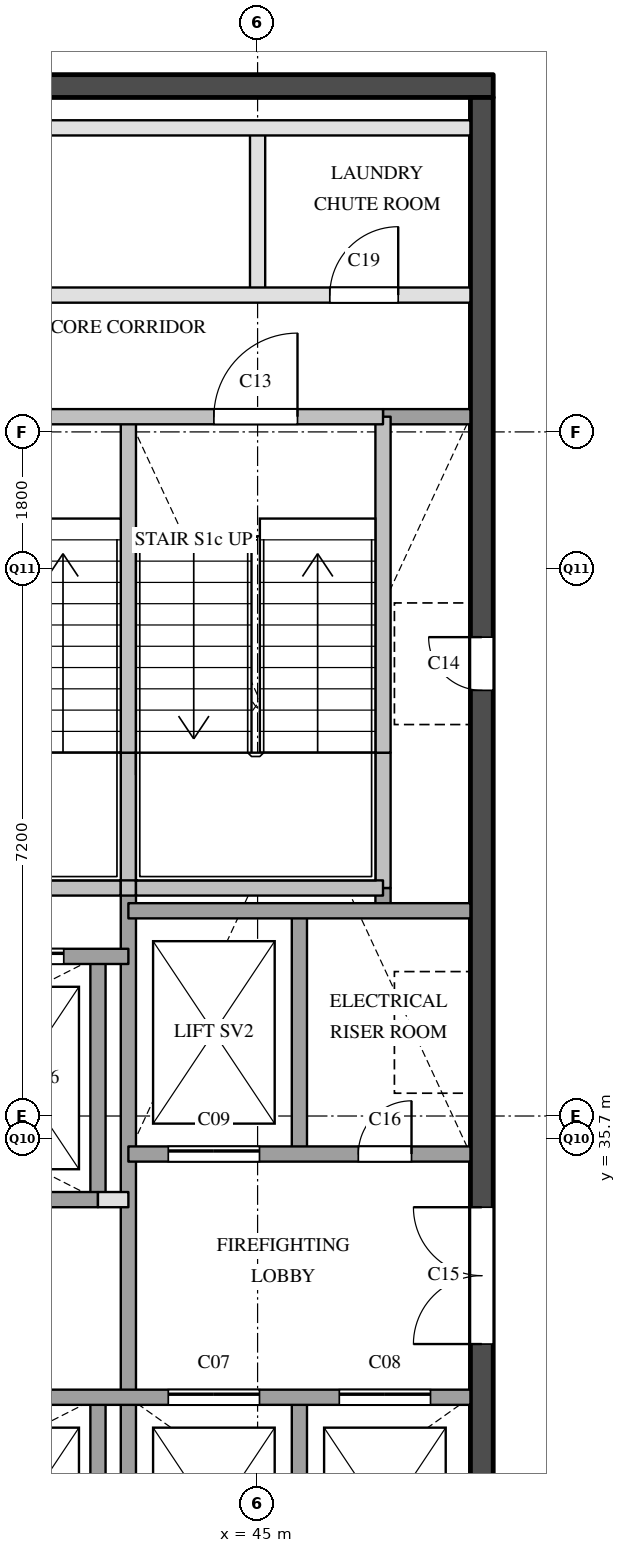
"""IFC4 building model, lengths in metres.
Left out: names, types, materials, properties, quantities, classifications, styles, units other than length and angle.
Written with IfcOpenShell. Run it as: python <this file> out.ifc"""

import sys

from ifc_helpers import new_model, si_unit, direction, frame, frame_2d, origin, place, context, subcontext, project, spatial, rectangle, extrude, element, fill, save


model = new_model("IFC4")
c1 = context("Model", 3, precision=1e-05, world=origin(), true_north=direction((0.0, 1.0)))
c2 = subcontext(c1, "Body", "Model", "MODEL_VIEW")
j1 = project(units=[si_unit("LENGTHUNIT", "METRE"), si_unit("PLANEANGLEUNIT", "RADIAN")], contexts=[c1])
p1 = place(None, origin())
s1 = spatial("IfcSite", under=j1, at=p1, CompositionType="ELEMENT")
p2 = place(p1, origin())
s2 = spatial("IfcBuilding", under=s1, at=p2, CompositionType="ELEMENT")
p3 = place(p2, frame((0.0, 0.0, 312.9)))
s3 = spatial("IfcBuildingStorey", under=s2, at=p3, CompositionType="ELEMENT", Elevation=312.9)
p4 = place(p3, frame((36.3, 49.55, 0.0), z_axis=(0.0, 0.0, 1.0), x_axis=(1.0, 0.0, 0.0)))
e1 = element("IfcWall", 1, at=p4, inside=s3, PredefinedType="SHEAR", context=c2, shape_type="SweptSolid", body=[
    extrude(rectangle(XDim=11.8, YDim=0.3, at=frame_2d((5.9, 0.0))), origin(), (0.0, 0.0, 1.0), 3.6),
])
p5 = place(p3, frame((47.95, 29.1, 0.0), z_axis=(0.0, 0.0, 1.0), x_axis=(0.0, 1.0, 0.0)))
e2 = element("IfcWall", 2, at=p5, inside=s3, PredefinedType="SHEAR", context=c2, shape_type="SweptSolid", body=[
    extrude(rectangle(XDim=20.3, YDim=0.3, at=frame_2d((10.15, 0.0))), origin(), (0.0, 0.0, 1.0), 3.6),
])
p6 = place(p5, frame((12.5, 0.0, 0.0)))
e3 = element("IfcOpeningElement", 3, at=p6, cuts=e2, PredefinedType="OPENING", context=c2, shape_type="SweptSolid", body=[
    extrude(rectangle(XDim=0.7, YDim=2.1, at=frame_2d((0.35, 1.05))), frame((0.0, 0.16, 0.0), z_axis=(0.0, -1.0, 0.0), x_axis=(1.0, 0.0, 0.0)), (0.0, 0.0, 1.0), 0.32),
])
p7 = place(p5, frame((3.9, 0.0, 0.0)))
e4 = element("IfcOpeningElement", 4, at=p7, cuts=e2, PredefinedType="OPENING", context=c2, shape_type="SweptSolid", body=[
    extrude(rectangle(XDim=1.8, YDim=2.1, at=frame_2d((0.9, 1.05))), frame((0.0, 0.16, 0.0), z_axis=(0.0, -1.0, 0.0), x_axis=(1.0, 0.0, 0.0)), (0.0, 0.0, 1.0), 0.32),
])
p8 = place(p3, frame((42.9, 29.1, 0.0), z_axis=(0.0, 0.0, 1.0), x_axis=(0.0, 1.0, 0.0)))
e5 = element("IfcWall", 5, at=p8, inside=s3, PredefinedType="SOLIDWALL", context=c2, shape_type="SweptSolid", body=[
    extrude(rectangle(XDim=3.2, YDim=0.2, at=frame_2d((1.6, 0.0))), origin(), (0.0, 0.0, 1.0), 3.6),
])
p9 = place(p3, frame((42.9, 34.9, 0.0), z_axis=(0.0, 0.0, 1.0), x_axis=(0.0, 1.0, 0.0)))
e6 = element("IfcWall", 6, at=p9, inside=s3, PredefinedType="SOLIDWALL", context=c2, shape_type="SweptSolid", body=[
    extrude(rectangle(XDim=3.2, YDim=0.2, at=frame_2d((1.6, 0.0))), origin(), (0.0, 0.0, 1.0), 3.6),
])
p10 = place(p3, frame((43.3, 29.1, 0.0), z_axis=(0.0, 0.0, 1.0), x_axis=(0.0, 1.0, 0.0)))
e7 = element("IfcWall", 7, at=p10, inside=s3, PredefinedType="SOLIDWALL", context=c2, shape_type="SweptSolid", body=[
    extrude(rectangle(XDim=9.9, YDim=0.2, at=frame_2d((4.95, 0.0))), origin(), (0.0, 0.0, 1.0), 3.6),
])
p11 = place(p3, frame((43.3, 39.0, 0.0), z_axis=(0.0, 0.0, 1.0), x_axis=(0.0, 1.0, 0.0)))
e8 = element("IfcWall", 8, at=p11, inside=s3, PredefinedType="SOLIDWALL", context=c2, shape_type="SweptSolid", body=[
    extrude(rectangle(XDim=1.78, YDim=0.2, at=frame_2d((0.89, 0.0))), origin(), (0.0, 0.0, 1.0), 3.6),
])
p12 = place(p3, frame((43.3, 40.78, 0.0), z_axis=(0.0, 0.0, 1.0), x_axis=(0.0, 1.0, 0.0)))
e9 = element("IfcWall", 9, at=p12, inside=s3, PredefinedType="SOLIDWALL", context=c2, shape_type="SweptSolid", body=[
    extrude(rectangle(XDim=4.42, YDim=0.2, at=frame_2d((2.21, 0.0))), origin(), (0.0, 0.0, 1.0), 3.6),
])
p13 = place(p3, frame((45.0, 46.8, 0.0), z_axis=(0.0, 0.0, 1.0), x_axis=(0.0, 1.0, 0.0)))
e10 = element("IfcWall", 10, at=p13, inside=s3, PredefinedType="PARTITIONING", context=c2, shape_type="SweptSolid", body=[
    extrude(rectangle(XDim=2.2, YDim=0.2, at=frame_2d((1.1, 0.0))), origin(), (0.0, 0.0, 1.0), 3.6),
])
for number, where, z_axis, x_axis in (
    (11, (45.55, 29.1, 0.0), (0.0, 0.0, 1.0), (0.0, 1.0, 0.0)),
    (12, (45.55, 35.5, 0.0), (0.0, 0.0, 1.0), (0.0, 1.0, 0.0)),
):
    element("IfcWall", number, at=place(p3, frame(where, z_axis=z_axis, x_axis=x_axis)), inside=s3, PredefinedType="SOLIDWALL", context=c2, shape_type="SweptSolid", body=[
        extrude(rectangle(XDim=3.2, YDim=0.2, at=frame_2d((1.6, 0.0))), origin(), (0.0, 0.0, 1.0), 3.6),
    ])
p14 = place(p3, frame((46.65, 38.7, 0.0), z_axis=(0.0, 0.0, 1.0), x_axis=(0.0, 1.0, 0.0)))
e13 = element("IfcWall", 13, at=p14, inside=s3, PredefinedType="SOLIDWALL", context=c2, shape_type="SweptSolid", body=[
    extrude(rectangle(XDim=0.3, YDim=0.2, at=frame_2d((0.15, 0.0))), origin(), (0.0, 0.0, 1.0), 3.6),
])
p15 = place(p3, frame((46.65, 39.0, 0.0), z_axis=(0.0, 0.0, 1.0), x_axis=(0.0, 1.0, 0.0)))
e14 = element("IfcWall", 14, at=p15, inside=s3, PredefinedType="SOLIDWALL", context=c2, shape_type="SweptSolid", body=[
    extrude(rectangle(XDim=1.78, YDim=0.2, at=frame_2d((0.89, 0.0))), origin(), (0.0, 0.0, 1.0), 3.6),
])
p16 = place(p3, frame((46.65, 40.78, 0.0), z_axis=(0.0, 0.0, 1.0), x_axis=(0.0, 1.0, 0.0)))
e15 = element("IfcWall", 15, at=p16, inside=s3, PredefinedType="SOLIDWALL", context=c2, shape_type="SweptSolid", body=[
    extrude(rectangle(XDim=4.42, YDim=0.2, at=frame_2d((2.21, 0.0))), origin(), (0.0, 0.0, 1.0), 3.6),
])
p17 = place(p3, frame((36.6, 32.3, 0.0), z_axis=(0.0, 0.0, 1.0), x_axis=(1.0, 0.0, 0.0)))
e16 = element("IfcWall", 16, at=p17, inside=s3, PredefinedType="SOLIDWALL", context=c2, shape_type="SweptSolid", body=[
    extrude(rectangle(XDim=11.2, YDim=0.2, at=frame_2d((5.6, 0.0))), origin(), (0.0, 0.0, 1.0), 3.6),
])
p18 = place(p17, frame((7.225, 0.0, 0.0)))
e17 = element("IfcOpeningElement", 17, at=p18, cuts=e16, PredefinedType="OPENING", context=c2, shape_type="SweptSolid", body=[
    extrude(rectangle(XDim=1.2, YDim=2.1, at=frame_2d((0.6, 1.05))), frame((0.0, 0.11, 0.0), z_axis=(0.0, -1.0, 0.0), x_axis=(1.0, 0.0, 0.0)), (0.0, 0.0, 1.0), 0.22),
])
p19 = place(p17, frame((9.475, 0.0, 0.0)))
e18 = element("IfcOpeningElement", 18, at=p19, cuts=e16, PredefinedType="OPENING", context=c2, shape_type="SweptSolid", body=[
    extrude(rectangle(XDim=1.2, YDim=2.1, at=frame_2d((0.6, 1.05))), frame((0.0, 0.11, 0.0), z_axis=(0.0, -1.0, 0.0), x_axis=(1.0, 0.0, 0.0)), (0.0, 0.0, 1.0), 0.22),
])
p20 = place(p3, frame((42.9, 34.9, 0.0), z_axis=(0.0, 0.0, 1.0), x_axis=(1.0, 0.0, 0.0)))
e19 = element("IfcWall", 19, at=p20, inside=s3, PredefinedType="PARTITIONING", context=c2, shape_type="SweptSolid", body=[
    extrude(rectangle(XDim=0.4, YDim=0.2, at=frame_2d((0.2, 0.0))), origin(), (0.0, 0.0, 1.0), 3.6),
])
p21 = place(p3, frame((36.6, 34.9, 0.0), z_axis=(0.0, 0.0, 1.0), x_axis=(1.0, 0.0, 0.0)))
e20 = element("IfcWall", 20, at=p21, inside=s3, PredefinedType="SOLIDWALL", context=c2, shape_type="SweptSolid", body=[
    extrude(rectangle(XDim=6.3, YDim=0.2, at=frame_2d((3.15, 0.0))), origin(), (0.0, 0.0, 1.0), 3.6),
])
p22 = place(p3, frame((43.3, 35.5, 0.0), z_axis=(0.0, 0.0, 1.0), x_axis=(1.0, 0.0, 0.0)))
e21 = element("IfcWall", 21, at=p22, inside=s3, PredefinedType="SOLIDWALL", context=c2, shape_type="SweptSolid", body=[
    extrude(rectangle(XDim=4.5, YDim=0.2, at=frame_2d((2.25, 0.0))), origin(), (0.0, 0.0, 1.0), 3.6),
])
p23 = place(p22, frame((0.525, 0.0, 0.0)))
e22 = element("IfcOpeningElement", 22, at=p23, cuts=e21, PredefinedType="OPENING", context=c2, shape_type="SweptSolid", body=[
    extrude(rectangle(XDim=1.2, YDim=2.1, at=frame_2d((0.6, 1.05))), frame((0.0, 0.11, 0.0), z_axis=(0.0, -1.0, 0.0), x_axis=(1.0, 0.0, 0.0)), (0.0, 0.0, 1.0), 0.22),
])
p24 = place(p22, frame((3.025, 0.0, 0.0)))
e23 = element("IfcOpeningElement", 23, at=p24, cuts=e21, PredefinedType="OPENING", context=c2, shape_type="SweptSolid", body=[
    extrude(rectangle(XDim=0.7, YDim=2.1, at=frame_2d((0.35, 1.05))), frame((0.0, 0.11, 0.0), z_axis=(0.0, -1.0, 0.0), x_axis=(1.0, 0.0, 0.0)), (0.0, 0.0, 1.0), 0.22),
])
p25 = place(p3, frame((36.6, 38.1, 0.0), z_axis=(0.0, 0.0, 1.0), x_axis=(1.0, 0.0, 0.0)))
e24 = element("IfcWall", 24, at=p25, inside=s3, PredefinedType="SOLIDWALL", context=c2, shape_type="SweptSolid", body=[
    extrude(rectangle(XDim=6.7, YDim=0.2, at=frame_2d((3.35, 0.0))), origin(), (0.0, 0.0, 1.0), 3.6),
])
p26 = place(p25, frame((0.45, 0.0, 0.0)))
e25 = element("IfcOpeningElement", 25, at=p26, cuts=e24, PredefinedType="OPENING", context=c2, shape_type="SweptSolid", body=[
    extrude(rectangle(XDim=1.2, YDim=2.1, at=frame_2d((0.6, 1.05))), frame((0.0, 0.11, 0.0), z_axis=(0.0, -1.0, 0.0), x_axis=(1.0, 0.0, 0.0)), (0.0, 0.0, 1.0), 0.22),
])
p27 = place(p25, frame((2.55, 0.0, 0.0)))
e26 = element("IfcOpeningElement", 26, at=p27, cuts=e24, PredefinedType="OPENING", context=c2, shape_type="SweptSolid", body=[
    extrude(rectangle(XDim=1.2, YDim=2.1, at=frame_2d((0.6, 1.05))), frame((0.0, 0.11, 0.0), z_axis=(0.0, -1.0, 0.0), x_axis=(1.0, 0.0, 0.0)), (0.0, 0.0, 1.0), 0.22),
])
p28 = place(p25, frame((4.65, 0.0, 0.0)))
e27 = element("IfcOpeningElement", 27, at=p28, cuts=e24, PredefinedType="OPENING", context=c2, shape_type="SweptSolid", body=[
    extrude(rectangle(XDim=1.2, YDim=2.1, at=frame_2d((0.6, 1.05))), frame((0.0, 0.11, 0.0), z_axis=(0.0, -1.0, 0.0), x_axis=(1.0, 0.0, 0.0)), (0.0, 0.0, 1.0), 0.22),
])
p29 = place(p3, frame((43.3, 38.7, 0.0), z_axis=(0.0, 0.0, 1.0), x_axis=(1.0, 0.0, 0.0)))
e28 = element("IfcWall", 28, at=p29, inside=s3, PredefinedType="SOLIDWALL", context=c2, shape_type="SweptSolid", body=[
    extrude(rectangle(XDim=4.5, YDim=0.2, at=frame_2d((2.25, 0.0))), origin(), (0.0, 0.0, 1.0), 3.6),
])
p30 = place(p3, frame((40.05, 39.0, 0.0), z_axis=(0.0, 0.0, 1.0), x_axis=(1.0, 0.0, 0.0)))
e29 = element("IfcWall", 29, at=p30, inside=s3, PredefinedType="SOLIDWALL", context=c2, shape_type="SweptSolid", body=[
    extrude(rectangle(XDim=3.15, YDim=0.2, at=frame_2d((1.575, 0.0))), origin(), (0.0, 0.0, 1.0), 3.6),
])
p31 = place(p3, frame((43.2, 39.0, 0.0), z_axis=(0.0, 0.0, 1.0), x_axis=(1.0, 0.0, 0.0)))
e30 = element("IfcWall", 30, at=p31, inside=s3, PredefinedType="SOLIDWALL", context=c2, shape_type="SweptSolid", body=[
    extrude(rectangle(XDim=0.2, YDim=0.2, at=frame_2d((0.1, 0.0))), origin(), (0.0, 0.0, 1.0), 3.6),
])
p32 = place(p3, frame((43.4, 39.0, 0.0), z_axis=(0.0, 0.0, 1.0), x_axis=(1.0, 0.0, 0.0)))
e31 = element("IfcWall", 31, at=p32, inside=s3, PredefinedType="SOLIDWALL", context=c2, shape_type="SweptSolid", body=[
    extrude(rectangle(XDim=3.25, YDim=0.2, at=frame_2d((1.625, 0.0))), origin(), (0.0, 0.0, 1.0), 3.6),
])
p33 = place(p3, frame((46.65, 45.2, 0.0), z_axis=(0.0, 0.0, 1.0), x_axis=(1.0, 0.0, 0.0)))
e32 = element("IfcWall", 32, at=p33, inside=s3, PredefinedType="SOLIDWALL", context=c2, shape_type="SweptSolid", body=[
    extrude(rectangle(XDim=1.15, YDim=0.2, at=frame_2d((0.575, 0.0))), origin(), (0.0, 0.0, 1.0), 3.6),
])
p34 = place(p3, frame((36.6, 45.2, 0.0), z_axis=(0.0, 0.0, 1.0), x_axis=(1.0, 0.0, 0.0)))
e33 = element("IfcWall", 33, at=p34, inside=s3, PredefinedType="SOLIDWALL", context=c2, shape_type="SweptSolid", body=[
    extrude(rectangle(XDim=10.05, YDim=0.2, at=frame_2d((5.025, 0.0))), origin(), (0.0, 0.0, 1.0), 3.6),
])
p35 = place(p34, frame((1.125, 0.0, 0.0)))
e34 = element("IfcOpeningElement", 34, at=p35, cuts=e33, PredefinedType="OPENING", context=c2, shape_type="SweptSolid", body=[
    extrude(rectangle(XDim=1.1, YDim=2.1, at=frame_2d((0.55, 1.05))), frame((0.0, 0.11, 0.0), z_axis=(0.0, -1.0, 0.0), x_axis=(1.0, 0.0, 0.0)), (0.0, 0.0, 1.0), 0.22),
])
p36 = place(p34, frame((4.475, 0.0, 0.0)))
e35 = element("IfcOpeningElement", 35, at=p36, cuts=e33, PredefinedType="OPENING", context=c2, shape_type="SweptSolid", body=[
    extrude(rectangle(XDim=1.1, YDim=2.1, at=frame_2d((0.55, 1.05))), frame((0.0, 0.11, 0.0), z_axis=(0.0, -1.0, 0.0), x_axis=(1.0, 0.0, 0.0)), (0.0, 0.0, 1.0), 0.22),
])
p37 = place(p34, frame((7.825, 0.0, 0.0)))
e36 = element("IfcOpeningElement", 36, at=p37, cuts=e33, PredefinedType="OPENING", context=c2, shape_type="SweptSolid", body=[
    extrude(rectangle(XDim=1.1, YDim=2.1, at=frame_2d((0.55, 1.05))), frame((0.0, 0.11, 0.0), z_axis=(0.0, -1.0, 0.0), x_axis=(1.0, 0.0, 0.0)), (0.0, 0.0, 1.0), 0.22),
])
p38 = place(p3, frame((36.6, 46.8, 0.0), z_axis=(0.0, 0.0, 1.0), x_axis=(1.0, 0.0, 0.0)))
e37 = element("IfcWall", 37, at=p38, inside=s3, PredefinedType="PARTITIONING", context=c2, shape_type="SweptSolid", body=[
    extrude(rectangle(XDim=11.2, YDim=0.2, at=frame_2d((5.6, 0.0))), origin(), (0.0, 0.0, 1.0), 3.6),
])
p39 = place(p38, frame((3.75, 0.0, 0.0)))
e38 = element("IfcOpeningElement", 38, at=p39, cuts=e37, PredefinedType="OPENING", context=c2, shape_type="SweptSolid", body=[
    extrude(rectangle(XDim=0.9, YDim=2.1, at=frame_2d((0.45, 1.05))), frame((0.0, 0.11, 0.0), z_axis=(0.0, -1.0, 0.0), x_axis=(1.0, 0.0, 0.0)), (0.0, 0.0, 1.0), 0.22),
])
p40 = place(p38, frame((9.35, 0.0, 0.0)))
e39 = element("IfcOpeningElement", 39, at=p40, cuts=e37, PredefinedType="OPENING", context=c2, shape_type="SweptSolid", body=[
    extrude(rectangle(XDim=0.9, YDim=2.1, at=frame_2d((0.45, 1.05))), frame((0.0, 0.11, 0.0), z_axis=(0.0, -1.0, 0.0), x_axis=(1.0, 0.0, 0.0)), (0.0, 0.0, 1.0), 0.22),
])
p41 = place(p3, frame((36.6, 49.0, 0.0), z_axis=(0.0, 0.0, 1.0), x_axis=(1.0, 0.0, 0.0)))
e40 = element("IfcWall", 40, at=p41, inside=s3, PredefinedType="PARTITIONING", context=c2, shape_type="SweptSolid", body=[
    extrude(rectangle(XDim=11.2, YDim=0.2, at=frame_2d((5.6, 0.0))), origin(), (0.0, 0.0, 1.0), 3.6),
])
p42 = place(p28, origin())
e41 = element("IfcDoor", 41, at=p42, inside=s3, OperationType="SLIDING_TO_LEFT", PredefinedType="DOOR", context=c2, shape_type="SweptSolid", body=[
    extrude(rectangle(XDim=1.2, YDim=2.1, at=frame_2d((0.6, 1.05))), frame((0.0, 0.025, 0.0), z_axis=(0.0, -1.0, 0.0), x_axis=(1.0, 0.0, 0.0)), (0.0, 0.0, 1.0), 0.05),
])
fill(e27, e41)
p43 = place(p18, origin())
e42 = element("IfcDoor", 42, at=p43, inside=s3, OperationType="SLIDING_TO_LEFT", PredefinedType="DOOR", context=c2, shape_type="SweptSolid", body=[
    extrude(rectangle(XDim=1.2, YDim=2.1, at=frame_2d((0.6, 1.05))), frame((0.0, 0.025, 0.0), z_axis=(0.0, -1.0, 0.0), x_axis=(1.0, 0.0, 0.0)), (0.0, 0.0, 1.0), 0.05),
])
fill(e17, e42)
p44 = place(p19, origin())
e43 = element("IfcDoor", 43, at=p44, inside=s3, OperationType="SLIDING_TO_LEFT", PredefinedType="DOOR", context=c2, shape_type="SweptSolid", body=[
    extrude(rectangle(XDim=1.2, YDim=2.1, at=frame_2d((0.6, 1.05))), frame((0.0, 0.025, 0.0), z_axis=(0.0, -1.0, 0.0), x_axis=(1.0, 0.0, 0.0)), (0.0, 0.0, 1.0), 0.05),
])
fill(e18, e43)
p45 = place(p23, origin())
e44 = element("IfcDoor", 44, at=p45, inside=s3, OperationType="SLIDING_TO_LEFT", PredefinedType="DOOR", context=c2, shape_type="SweptSolid", body=[
    extrude(rectangle(XDim=1.2, YDim=2.1, at=frame_2d((0.6, 1.05))), frame((0.0, 0.025, 0.0), z_axis=(0.0, -1.0, 0.0), x_axis=(1.0, 0.0, 0.0)), (0.0, 0.0, 1.0), 0.05),
])
fill(e22, e44)
p46 = place(p37, origin())
e45 = element("IfcDoor", 45, at=p46, inside=s3, OperationType="SINGLE_SWING_RIGHT", PredefinedType="DOOR", context=c2, shape_type="SweptSolid", body=[
    extrude(rectangle(XDim=1.1, YDim=2.1, at=frame_2d((0.55, 1.05))), frame((0.0, 0.025, 0.0), z_axis=(0.0, -1.0, 0.0), x_axis=(1.0, 0.0, 0.0)), (0.0, 0.0, 1.0), 0.05),
])
fill(e36, e45)
p47 = place(p6, origin())
e46 = element("IfcDoor", 46, at=p47, inside=s3, OperationType="SINGLE_SWING_RIGHT", PredefinedType="DOOR", context=c2, shape_type="SweptSolid", body=[
    extrude(rectangle(XDim=0.7, YDim=2.1, at=frame_2d((0.35, 1.05))), frame((0.0, 0.025, 0.0), z_axis=(0.0, -1.0, 0.0), x_axis=(1.0, 0.0, 0.0)), (0.0, 0.0, 1.0), 0.05),
])
fill(e3, e46)
p48 = place(p7, origin())
e47 = element("IfcDoor", 47, at=p48, inside=s3, OperationType="DOUBLE_DOOR_SINGLE_SWING", PredefinedType="DOOR", context=c2, shape_type="SweptSolid", body=[
    extrude(rectangle(XDim=1.8, YDim=2.1, at=frame_2d((0.9, 1.05))), frame((0.0, 0.025, 0.0), z_axis=(0.0, -1.0, 0.0), x_axis=(1.0, 0.0, 0.0)), (0.0, 0.0, 1.0), 0.05),
])
fill(e4, e47)
p49 = place(p24, origin())
e48 = element("IfcDoor", 48, at=p49, inside=s3, OperationType="SINGLE_SWING_RIGHT", PredefinedType="DOOR", context=c2, shape_type="SweptSolid", body=[
    extrude(rectangle(XDim=0.7, YDim=2.1, at=frame_2d((0.35, 1.05))), frame((0.0, 0.025, 0.0), z_axis=(0.0, -1.0, 0.0), x_axis=(1.0, 0.0, 0.0)), (0.0, 0.0, 1.0), 0.05),
])
fill(e23, e48)
p50 = place(p40, origin())
e49 = element("IfcDoor", 49, at=p50, inside=s3, OperationType="SINGLE_SWING_RIGHT", PredefinedType="DOOR", context=c2, shape_type="SweptSolid", body=[
    extrude(rectangle(XDim=0.9, YDim=2.1, at=frame_2d((0.45, 1.05))), frame((0.0, 0.025, 0.0), z_axis=(0.0, -1.0, 0.0), x_axis=(1.0, 0.0, 0.0)), (0.0, 0.0, 1.0), 0.05),
])
fill(e39, e49)
save(model, sys.argv[1])
